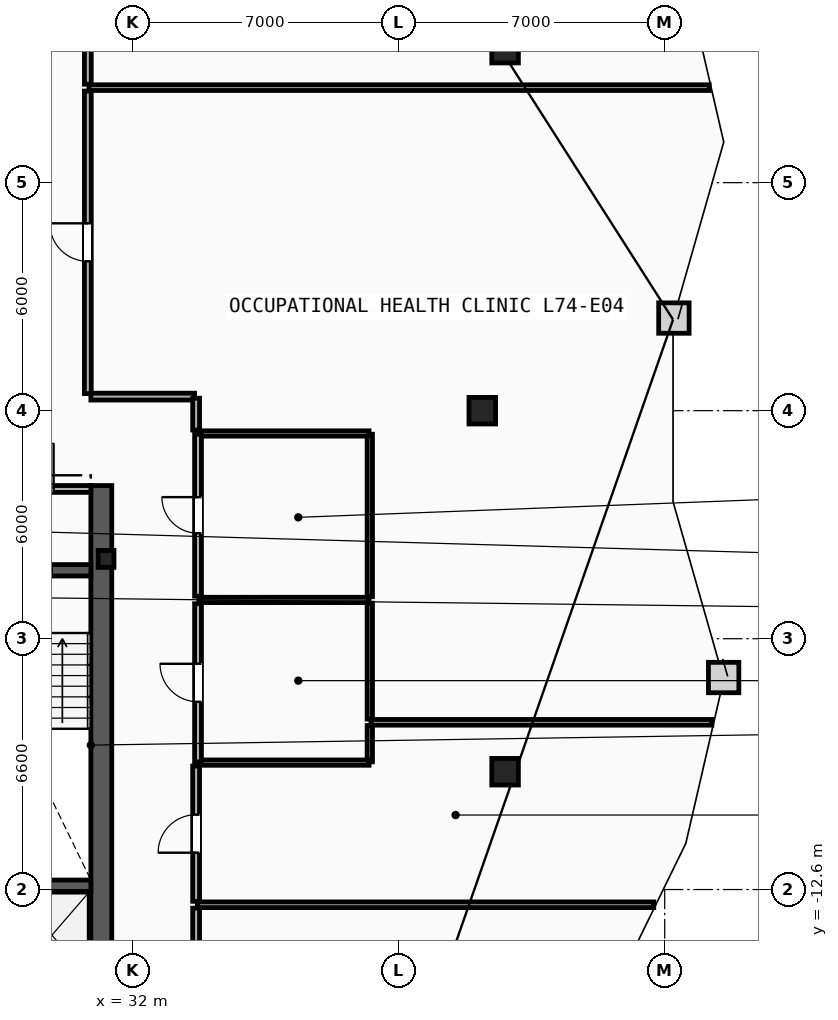
"""IFC4 building model, lengths in metres.
Left out: names, types, materials, properties, quantities, classifications, styles, units other than length and angle.
Written with IfcOpenShell. Run it as: python <this file> out.ifc"""

import sys

from ifc_helpers import new_model, si_unit, direction, frame, frame_2d, origin, origin_2d, place, context, subcontext, project, spatial, rectangle, i_section, extrude, element, fill, save


model = new_model("IFC4")
c1 = context("Model", 3, precision=1e-05, world=origin(), true_north=direction((0.0, 1.0)))
c2 = subcontext(c1, "Body", "Model", "MODEL_VIEW")
j1 = project(units=[si_unit("LENGTHUNIT", "METRE"), si_unit("PLANEANGLEUNIT", "RADIAN")], contexts=[c1])
p1 = place(None, origin())
s1 = spatial("IfcSite", under=j1, at=p1, CompositionType="ELEMENT")
p2 = place(p1, origin())
s2 = spatial("IfcBuilding", under=s1, at=p2, CompositionType="ELEMENT")
p3 = place(p2, frame((0.0, 0.0, 279.2)))
s3 = spatial("IfcBuildingStorey", under=s2, at=p3, CompositionType="ELEMENT", Elevation=279.2)
p4 = place(p3, frame((31.3, -3.9, 0.0), z_axis=(0.0, 0.0, 1.0), x_axis=(1.0, 0.0, 0.0)))
e1 = element("IfcColumn", 1, at=p4, inside=s3, PredefinedType="COLUMN", context=c2, shape_type="SweptSolid", body=[
    extrude(i_section(OverallWidth=0.416, OverallDepth=0.446, WebThickness=0.039, FlangeThickness=0.063, FilletRadius=0.018, at=origin_2d()), origin(), (0.0, 0.0, 1.0), 3.6),
])
for number, where, z_axis, x_axis in (
    (2, (41.2, 0.0, 0.0), (0.0, 0.0, 1.0), (1.0, 0.0, 0.0)),
    (3, (41.8, -9.5, 0.0), (0.0, 0.0, 1.0), (1.0, 0.0, 0.0)),
    (4, (41.8, 9.5, 0.0), (0.0, 0.0, 1.0), (1.0, 0.0, 0.0)),
):
    element("IfcColumn", number, at=place(p3, frame(where, z_axis=z_axis, x_axis=x_axis)), inside=s3, PredefinedType="COLUMN", context=c2, shape_type="SweptSolid", body=[
        extrude(rectangle(XDim=0.7, YDim=0.7, at=origin_2d()), origin(), (0.0, 0.0, 1.0), 3.6),
    ])
p5 = place(p3, frame((31.175, -15.3, 0.0), z_axis=(0.0, 0.0, 1.0), x_axis=(0.0, 1.0, 0.0)))
e5 = element("IfcWall", 5, at=p5, inside=s3, PredefinedType="SHEAR", context=c2, shape_type="SweptSolid", body=[
    extrude(rectangle(XDim=13.33, YDim=0.55, at=frame_2d((6.665, 0.0))), origin(), (0.0, 0.0, 1.0), 3.34),
])
p6 = place(p3, frame((27.74, -4.2, 0.0), z_axis=(0.0, 0.0, 1.0), x_axis=(1.0, 0.0, 0.0)))
e6 = element("IfcWall", 6, at=p6, inside=s3, PredefinedType="SHEAR", context=c2, shape_type="SweptSolid", body=[
    extrude(rectangle(XDim=3.16, YDim=0.3, at=frame_2d((1.58, 0.0))), origin(), (0.0, 0.0, 1.0), 3.34),
])
p7 = place(p6, frame((1.03, 0.0, 0.0)))
e7 = element("IfcOpeningElement", 7, at=p7, cuts=e6, PredefinedType="OPENING", context=c2, shape_type="SweptSolid", body=[
    extrude(rectangle(XDim=1.1, YDim=2.15, at=frame_2d((0.55, 1.075))), frame((0.0, 0.16, 0.0), z_axis=(0.0, -1.0, 0.0), x_axis=(1.0, 0.0, 0.0)), (0.0, 0.0, 1.0), 0.32),
])
p8 = place(p3, frame((27.74, -12.5, 0.0), z_axis=(0.0, 0.0, 1.0), x_axis=(1.0, 0.0, 0.0)))
e8 = element("IfcWall", 8, at=p8, inside=s3, PredefinedType="SHEAR", context=c2, shape_type="SweptSolid", body=[
    extrude(rectangle(XDim=3.16, YDim=0.3, at=frame_2d((1.58, 0.0))), origin(), (0.0, 0.0, 1.0), 3.34),
])
p9 = place(p3, frame((27.74, -2.06, 0.0), z_axis=(0.0, 0.0, 1.0), x_axis=(1.0, 0.0, 0.0)))
e9 = element("IfcWall", 9, at=p9, inside=s3, PredefinedType="PARTITIONING", context=c2, shape_type="SweptSolid", body=[
    extrude(rectangle(XDim=3.16, YDim=0.18, at=frame_2d((1.58, 0.0))), origin(), (0.0, 0.0, 1.0), 3.34),
])
p10 = place(p9, frame((0.98, 0.0, 0.0)))
e10 = element("IfcOpeningElement", 10, at=p10, cuts=e9, PredefinedType="OPENING", context=c2, shape_type="SweptSolid", body=[
    extrude(rectangle(XDim=1.2, YDim=2.15, at=frame_2d((0.6, 1.075))), frame((0.0, 0.1, 0.0), z_axis=(0.0, -1.0, 0.0), x_axis=(1.0, 0.0, 0.0)), (0.0, 0.0, 1.0), 0.2),
])
p11 = place(p3, frame((38.24, -9.24, 0.0), z_axis=(0.0, 0.0, 1.0), x_axis=(0.0, 1.0, 0.0)))
e11 = element("IfcWall", 11, at=p11, inside=s3, PredefinedType="PARTITIONING", context=c2, shape_type="SweptSolid", body=[
    extrude(rectangle(XDim=0.955, YDim=0.14, at=frame_2d((0.478, 0.0))), origin(), (0.0, 0.0, 1.0), 3.34),
])
p12 = place(p3, frame((38.24, -8.115, 0.0), z_axis=(0.0, 0.0, 1.0), x_axis=(0.0, 1.0, 0.0)))
e12 = element("IfcWall", 12, at=p12, inside=s3, PredefinedType="PARTITIONING", context=c2, shape_type="SweptSolid", body=[
    extrude(rectangle(XDim=3.05, YDim=0.14, at=frame_2d((1.525, 0.0))), origin(), (0.0, 0.0, 1.0), 3.34),
])
p13 = place(p3, frame((38.24, -4.895, 0.0), z_axis=(0.0, 0.0, 1.0), x_axis=(0.0, 1.0, 0.0)))
e13 = element("IfcWall", 13, at=p13, inside=s3, PredefinedType="PARTITIONING", context=c2, shape_type="SweptSolid", body=[
    extrude(rectangle(XDim=4.275, YDim=0.14, at=frame_2d((2.137, 0.0))), origin(), (0.0, 0.0, 1.0), 3.34),
])
for number, where, z_axis, x_axis in (
    (14, (33.74, -0.6, 0.0), (0.0, 0.0, 1.0), (1.0, 0.0, 0.0)),
    (15, (33.74, -4.98, 0.0), (0.0, 0.0, 1.0), (1.0, 0.0, 0.0)),
    (16, (33.74, -9.26, 0.0), (0.0, 0.0, 1.0), (1.0, 0.0, 0.0)),
):
    element("IfcWall", number, at=place(p3, frame(where, z_axis=z_axis, x_axis=x_axis)), inside=s3, PredefinedType="PARTITIONING", context=c2, shape_type="SweptSolid", body=[
        extrude(rectangle(XDim=4.48, YDim=0.14, at=frame_2d((2.24, 0.0))), origin(), (0.0, 0.0, 1.0), 3.34),
    ])
p14 = place(p3, frame((33.72, -4.88, 0.0), z_axis=(0.0, 0.0, 1.0), x_axis=(0.0, 1.0, 0.0)))
e17 = element("IfcWall", 17, at=p14, inside=s3, PredefinedType="PARTITIONING", context=c2, shape_type="SweptSolid", body=[
    extrude(rectangle(XDim=4.26, YDim=0.18, at=frame_2d((2.13, 0.0))), origin(), (0.0, 0.0, 1.0), 3.34),
])
p15 = place(p14, frame((1.655, 0.0, 0.0)))
e18 = element("IfcOpeningElement", 18, at=p15, cuts=e17, PredefinedType="OPENING", context=c2, shape_type="SweptSolid", body=[
    extrude(rectangle(XDim=0.95, YDim=2.1, at=frame_2d((0.475, 1.05))), frame((0.0, 0.1, 0.0), z_axis=(0.0, -1.0, 0.0), x_axis=(1.0, 0.0, 0.0)), (0.0, 0.0, 1.0), 0.2),
])
p16 = place(p3, frame((33.72, -9.24, 0.0), z_axis=(0.0, 0.0, 1.0), x_axis=(0.0, 1.0, 0.0)))
e19 = element("IfcWall", 19, at=p16, inside=s3, PredefinedType="PARTITIONING", context=c2, shape_type="SweptSolid", body=[
    extrude(rectangle(XDim=4.16, YDim=0.18, at=frame_2d((2.08, 0.0))), origin(), (0.0, 0.0, 1.0), 3.34),
])
p17 = place(p16, frame((1.58, 0.0, 0.0)))
e20 = element("IfcOpeningElement", 20, at=p17, cuts=e19, PredefinedType="OPENING", context=c2, shape_type="SweptSolid", body=[
    extrude(rectangle(XDim=1.0, YDim=2.15, at=frame_2d((0.5, 1.075))), frame((0.0, 0.1, 0.0), z_axis=(0.0, -1.0, 0.0), x_axis=(1.0, 0.0, 0.0)), (0.0, 0.0, 1.0), 0.2),
])
p18 = place(p3, frame((30.85, 8.5, 0.0), z_axis=(0.0, 0.0, 1.0), x_axis=(1.0, 0.0, 0.0)))
e21 = element("IfcWall", 21, at=p18, inside=s3, PredefinedType="PARTITIONING", context=c2, shape_type="SweptSolid", body=[
    extrude(rectangle(XDim=16.322, YDim=0.15, at=frame_2d((8.161, 0.0))), origin(), (0.0, 0.0, 1.0), 3.34),
])
p19 = place(p3, frame((38.27, -8.2, 0.0), z_axis=(0.0, 0.0, 1.0), x_axis=(1.0, 0.0, 0.0)))
e22 = element("IfcWall", 22, at=p19, inside=s3, PredefinedType="PARTITIONING", context=c2, shape_type="SweptSolid", body=[
    extrude(rectangle(XDim=8.971, YDim=0.15, at=frame_2d((4.486, 0.0))), origin(), (0.0, 0.0, 1.0), 3.34),
])
p20 = place(p3, frame((33.7, -13.0, 0.0), z_axis=(0.0, 0.0, 1.0), x_axis=(1.0, 0.0, 0.0)))
e23 = element("IfcWall", 23, at=p20, inside=s3, PredefinedType="PARTITIONING", context=c2, shape_type="SweptSolid", body=[
    extrude(rectangle(XDim=12.013, YDim=0.15, at=frame_2d((6.006, 0.0))), origin(), (0.0, 0.0, 1.0), 3.34),
])
p21 = place(p3, frame((33.67, -17.428, 0.0), z_axis=(0.0, 0.0, 1.0), x_axis=(0.0, 1.0, 0.0)))
e24 = element("IfcWall", 24, at=p21, inside=s3, PredefinedType="PARTITIONING", context=c2, shape_type="SweptSolid", body=[
    extrude(rectangle(XDim=4.338, YDim=0.18, at=frame_2d((2.169, 0.0))), origin(), (0.0, 0.0, 1.0), 3.34),
])
p22 = place(p3, frame((33.67, -12.91, 0.0), z_axis=(0.0, 0.0, 1.0), x_axis=(0.0, 1.0, 0.0)))
e25 = element("IfcWall", 25, at=p22, inside=s3, PredefinedType="PARTITIONING", context=c2, shape_type="SweptSolid", body=[
    extrude(rectangle(XDim=3.559, YDim=0.18, at=frame_2d((1.779, 0.0))), origin(), (0.0, 0.0, 1.0), 3.34),
])
p23 = place(p22, frame((1.279, 0.0, 0.0)))
e26 = element("IfcOpeningElement", 26, at=p23, cuts=e25, PredefinedType="OPENING", context=c2, shape_type="SweptSolid", body=[
    extrude(rectangle(XDim=1.0, YDim=2.15, at=frame_2d((0.5, 1.075))), frame((0.0, 0.1, 0.0), z_axis=(0.0, -1.0, 0.0), x_axis=(1.0, 0.0, 0.0)), (0.0, 0.0, 1.0), 0.2),
])
p24 = place(p3, frame((30.82, 0.45, 0.0), z_axis=(0.0, 0.0, 1.0), x_axis=(0.0, 1.0, 0.0)))
e27 = element("IfcWall", 27, at=p24, inside=s3, PredefinedType="PARTITIONING", context=c2, shape_type="SweptSolid", body=[
    extrude(rectangle(XDim=7.96, YDim=0.18, at=frame_2d((3.98, 0.0))), origin(), (0.0, 0.0, 1.0), 3.34),
])
p25 = place(p24, frame((3.48, 0.0, 0.0)))
e28 = element("IfcOpeningElement", 28, at=p25, cuts=e27, PredefinedType="OPENING", context=c2, shape_type="SweptSolid", body=[
    extrude(rectangle(XDim=1.0, YDim=2.15, at=frame_2d((0.5, 1.075))), frame((0.0, 0.1, 0.0), z_axis=(0.0, -1.0, 0.0), x_axis=(1.0, 0.0, 0.0)), (0.0, 0.0, 1.0), 0.2),
])
p26 = place(p3, frame((33.628, 0.37, 0.0), z_axis=(0.0, 0.0, 1.0), x_axis=(-1.0, 0.0, 0.0)))
e29 = element("IfcWall", 29, at=p26, inside=s3, PredefinedType="PARTITIONING", context=c2, shape_type="SweptSolid", body=[
    extrude(rectangle(XDim=2.729, YDim=0.18, at=frame_2d((1.364, 0.0))), origin(), (0.0, 0.0, 1.0), 3.34),
])
p27 = place(p3, frame((33.67, -0.509, 0.0), z_axis=(0.0, 0.0, 1.0), x_axis=(0.0, 1.0, 0.0)))
e30 = element("IfcWall", 30, at=p27, inside=s3, PredefinedType="PARTITIONING", context=c2, shape_type="SweptSolid", body=[
    extrude(rectangle(XDim=0.837, YDim=0.18, at=frame_2d((0.418, 0.0))), origin(), (0.0, 0.0, 1.0), 3.34),
])
p28 = place(p3, frame((30.82, 8.59, 0.0), z_axis=(0.0, 0.0, 1.0), x_axis=(0.0, 1.0, 0.0)))
e31 = element("IfcWall", 31, at=p28, inside=s3, PredefinedType="PARTITIONING", context=c2, shape_type="SweptSolid", body=[
    extrude(rectangle(XDim=2.188, YDim=0.18, at=frame_2d((1.094, 0.0))), origin(), (0.0, 0.0, 1.0), 3.34),
])
p29 = place(p10, origin())
e32 = element("IfcDoor", 32, at=p29, inside=s3, OperationType="SINGLE_SWING_RIGHT", PredefinedType="DOOR", context=c2, shape_type="SweptSolid", body=[
    extrude(rectangle(XDim=1.2, YDim=2.15, at=frame_2d((0.6, 1.075))), frame((0.0, 0.025, 0.0), z_axis=(0.0, -1.0, 0.0), x_axis=(1.0, 0.0, 0.0)), (0.0, 0.0, 1.0), 0.05),
])
fill(e10, e32)
p30 = place(p25, origin())
e33 = element("IfcDoor", 33, at=p30, inside=s3, OperationType="SINGLE_SWING_RIGHT", PredefinedType="DOOR", context=c2, shape_type="SweptSolid", body=[
    extrude(rectangle(XDim=1.0, YDim=2.15, at=frame_2d((0.5, 1.075))), frame((0.0, 0.025, 0.0), z_axis=(0.0, -1.0, 0.0), x_axis=(1.0, 0.0, 0.0)), (0.0, 0.0, 1.0), 0.05),
])
fill(e28, e33)
p31 = place(p15, origin())
e34 = element("IfcDoor", 34, at=p31, inside=s3, OperationType="SINGLE_SWING_RIGHT", PredefinedType="DOOR", context=c2, shape_type="SweptSolid", body=[
    extrude(rectangle(XDim=0.95, YDim=2.1, at=frame_2d((0.475, 1.05))), frame((0.0, 0.025, 0.0), z_axis=(0.0, -1.0, 0.0), x_axis=(1.0, 0.0, 0.0)), (0.0, 0.0, 1.0), 0.05),
])
fill(e18, e34)
p32 = place(p17, origin())
e35 = element("IfcDoor", 35, at=p32, inside=s3, OperationType="SINGLE_SWING_RIGHT", PredefinedType="DOOR", context=c2, shape_type="SweptSolid", body=[
    extrude(rectangle(XDim=1.0, YDim=2.15, at=frame_2d((0.5, 1.075))), frame((0.0, 0.025, 0.0), z_axis=(0.0, -1.0, 0.0), x_axis=(1.0, 0.0, 0.0)), (0.0, 0.0, 1.0), 0.05),
])
fill(e20, e35)
p33 = place(p23, origin())
e36 = element("IfcDoor", 36, at=p33, inside=s3, OperationType="SINGLE_SWING_LEFT", PredefinedType="DOOR", context=c2, shape_type="SweptSolid", body=[
    extrude(rectangle(XDim=1.0, YDim=2.15, at=frame_2d((0.5, 1.075))), frame((0.0, 0.025, 0.0), z_axis=(0.0, -1.0, 0.0), x_axis=(1.0, 0.0, 0.0)), (0.0, 0.0, 1.0), 0.05),
])
fill(e26, e36)
save(model, sys.argv[1])
